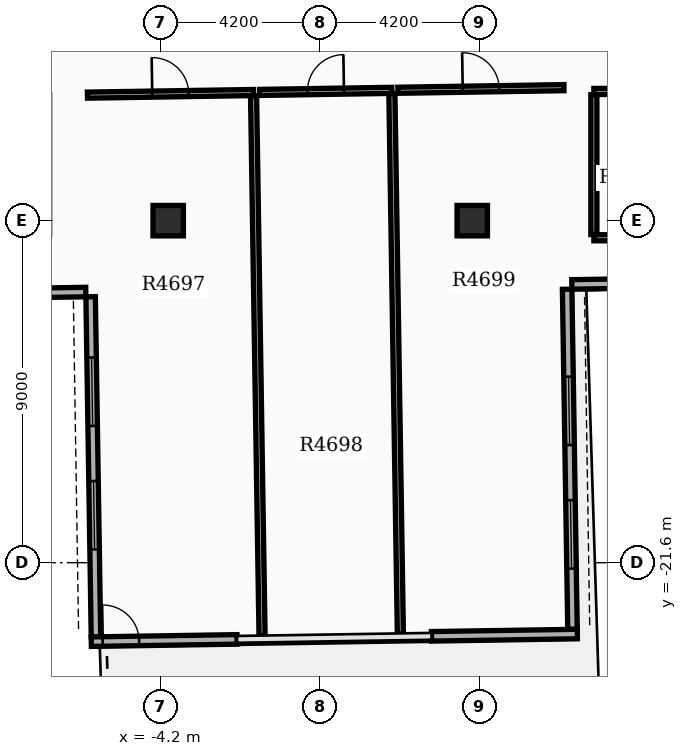
"""IFC4 building model, lengths in metres.
Left out: names, types, materials, properties, quantities, classifications, styles, units other than length and angle.
Written with IfcOpenShell. Run it as: python <this file> out.ifc"""

import sys

from ifc_helpers import new_model, si_unit, direction, frame, frame_2d, origin, origin_2d, place, context, subcontext, project, spatial, rectangle, extrude, element, fill, save


model = new_model("IFC4")
c1 = context("Model", 3, precision=1e-05, world=origin(), true_north=direction((0.0, 1.0)))
c2 = subcontext(c1, "Body", "Model", "MODEL_VIEW")
j1 = project(units=[si_unit("LENGTHUNIT", "METRE"), si_unit("PLANEANGLEUNIT", "RADIAN")], contexts=[c1])
p1 = place(None, origin())
s1 = spatial("IfcSite", under=j1, at=p1, CompositionType="ELEMENT")
p2 = place(p1, origin())
s2 = spatial("IfcBuilding", under=s1, at=p2, CompositionType="ELEMENT")
p3 = place(p2, frame((0.0, 0.0, 303.9)))
s3 = spatial("IfcBuildingStorey", under=s2, at=p3, CompositionType="ELEMENT", Elevation=303.9)
for number, where, z_axis, x_axis in (
    (1, (-4.0, -12.6, 0.0), (0.0, 0.0, 1.0), (1.0, 0.0, 0.0)),
    (2, (4.0, -12.6, 0.0), (0.0, 0.0, 1.0), (1.0, 0.0, 0.0)),
):
    element("IfcColumn", number, at=place(p3, frame(where, z_axis=z_axis, x_axis=x_axis)), inside=s3, PredefinedType="COLUMN", context=c2, shape_type="SweptSolid", body=[
        extrude(rectangle(XDim=0.8, YDim=0.8, at=origin_2d()), origin(), (0.0, 0.0, 1.0), 4.5),
    ])
p4 = place(p3, frame((-6.042, -14.602, 0.0), z_axis=(0.0, 0.0, 1.0), x_axis=(0.015712579601, -0.999876549801, 0.0)))
e3 = element("IfcWall", 3, at=p4, inside=s3, PredefinedType="STANDARD", context=c2, shape_type="SweptSolid", body=[
    extrude(rectangle(XDim=8.95, YDim=0.25, at=frame_2d((4.475, 0.0))), origin(), (0.0, 0.0, 1.0), 3.73),
])
p5 = place(p4, frame((1.6, 0.0, 0.8)))
e4 = element("IfcOpeningElement", 4, at=p5, cuts=e3, PredefinedType="OPENING", context=c2, shape_type="SweptSolid", body=[
    extrude(rectangle(XDim=1.8, YDim=1.8, at=frame_2d((0.9, 0.9))), frame((0.0, 0.135, 0.0), z_axis=(0.0, -1.0, 0.0), x_axis=(1.0, 0.0, 0.0)), (0.0, 0.0, 1.0), 0.27),
])
p6 = place(p4, frame((4.85, 0.0, 0.8)))
e5 = element("IfcOpeningElement", 5, at=p6, cuts=e3, PredefinedType="OPENING", context=c2, shape_type="SweptSolid", body=[
    extrude(rectangle(XDim=1.8, YDim=1.8, at=frame_2d((0.9, 0.9))), frame((0.0, 0.135, 0.0), z_axis=(0.0, -1.0, 0.0), x_axis=(1.0, 0.0, 0.0)), (0.0, 0.0, 1.0), 0.27),
])
p7 = place(p3, frame((6.638, -23.354, 0.0), z_axis=(0.0, 0.0, 1.0), x_axis=(-0.015712579601, 0.999876549801, 0.0)))
e6 = element("IfcWall", 6, at=p7, inside=s3, PredefinedType="STANDARD", context=c2, shape_type="SweptSolid", body=[
    extrude(rectangle(XDim=8.95, YDim=0.25, at=frame_2d((4.475, 0.0))), origin(), (0.0, 0.0, 1.0), 3.73),
])
p8 = place(p7, frame((1.6, 0.0, 0.8)))
e7 = element("IfcOpeningElement", 7, at=p8, cuts=e6, PredefinedType="OPENING", context=c2, shape_type="SweptSolid", body=[
    extrude(rectangle(XDim=1.8, YDim=1.8, at=frame_2d((0.9, 0.9))), frame((0.0, 0.135, 0.0), z_axis=(0.0, -1.0, 0.0), x_axis=(1.0, 0.0, 0.0)), (0.0, 0.0, 1.0), 0.27),
])
p9 = place(p7, frame((4.85, 0.0, 0.8)))
e8 = element("IfcOpeningElement", 8, at=p9, cuts=e6, PredefinedType="OPENING", context=c2, shape_type="SweptSolid", body=[
    extrude(rectangle(XDim=1.8, YDim=1.8, at=frame_2d((0.9, 0.9))), frame((0.0, 0.135, 0.0), z_axis=(0.0, -1.0, 0.0), x_axis=(1.0, 0.0, 0.0)), (0.0, 0.0, 1.0), 0.27),
])
p10 = place(p3, frame((-6.024, -23.677, 0.0), z_axis=(0.0, 0.0, 1.0), x_axis=(0.999876487775, 0.015716526186, 0.0)))
e9 = element("IfcWall", 9, at=p10, inside=s3, PredefinedType="STANDARD", context=c2, shape_type="SweptSolid", body=[
    extrude(rectangle(XDim=3.837, YDim=0.25, at=frame_2d((1.918, 0.0))), origin(), (0.0, 0.0, 1.0), 3.73),
])
p11 = place(p10, frame((0.3, 0.0, 0.0)))
e10 = element("IfcOpeningElement", 10, at=p11, cuts=e9, PredefinedType="OPENING", context=c2, shape_type="SweptSolid", body=[
    extrude(rectangle(XDim=0.96, YDim=2.1, at=frame_2d((0.48, 1.05))), frame((0.0, 0.135, 0.0), z_axis=(0.0, -1.0, 0.0), x_axis=(1.0, 0.0, 0.0)), (0.0, 0.0, 1.0), 0.27),
])
p12 = place(p3, frame((2.928, -23.537, 0.0), z_axis=(0.0, 0.0, 1.0), x_axis=(0.99987650349, 0.015715526335, 0.0)))
e11 = element("IfcWall", 11, at=p12, inside=s3, PredefinedType="STANDARD", context=c2, shape_type="SweptSolid", body=[
    extrude(rectangle(XDim=3.837, YDim=0.25, at=frame_2d((1.918, 0.0))), origin(), (0.0, 0.0, 1.0), 3.73),
])
p13 = place(p3, frame((-12.528, -14.579, 0.0), z_axis=(0.0, 0.0, 1.0), x_axis=(0.999876749821, 0.015699846079, 0.0)))
e12 = element("IfcWall", 12, at=p13, inside=s3, PredefinedType="STANDARD", context=c2, shape_type="SweptSolid", body=[
    extrude(rectangle(XDim=6.36, YDim=0.25, at=frame_2d((3.18, 0.0))), origin(), (0.0, 0.0, 1.0), 3.73),
])
p14 = place(p3, frame((12.979, -14.178, 0.0), z_axis=(0.0, 0.0, 1.0), x_axis=(-0.999876740359, -0.015700448681, 0.0)))
e13 = element("IfcWall", 13, at=p14, inside=s3, PredefinedType="STANDARD", context=c2, shape_type="SweptSolid", body=[
    extrude(rectangle(XDim=6.36, YDim=0.25, at=frame_2d((3.18, 0.0))), origin(), (0.0, 0.0, 1.0), 3.73),
])
p15 = place(p3, frame((-6.125, -9.297, 0.0), z_axis=(0.0, 0.0, 1.0), x_axis=(0.999876762784, 0.015699020525, 0.0)))
e14 = element("IfcWall", 14, at=p15, inside=s3, PredefinedType="PARTITIONING", context=c2, shape_type="SweptSolid", body=[
    extrude(rectangle(XDim=4.37, YDim=0.16, at=frame_2d((2.185, 0.0))), origin(), (0.0, 0.0, 1.0), 3.72),
])
p16 = place(p15, frame((1.705, 0.0, 0.0)))
e15 = element("IfcOpeningElement", 15, at=p16, cuts=e14, PredefinedType="OPENING", context=c2, shape_type="SweptSolid", body=[
    extrude(rectangle(XDim=0.96, YDim=2.15, at=frame_2d((0.48, 1.075))), frame((0.0, 0.09, 0.0), z_axis=(0.0, -1.0, 0.0), x_axis=(1.0, 0.0, 0.0)), (0.0, 0.0, 1.0), 0.18),
])
p17 = place(p3, frame((-1.531, -23.522, 0.0), z_axis=(0.0, 0.0, 1.0), x_axis=(-0.015703340364, 0.999876694949, 0.0)))
e16 = element("IfcWall", 16, at=p17, inside=s3, PredefinedType="PARTITIONING", context=c2, shape_type="SweptSolid", body=[
    extrude(rectangle(XDim=14.21, YDim=0.16, at=frame_2d((7.105, 0.0))), origin(), (0.0, 0.0, 1.0), 3.72),
])
p18 = place(p3, frame((-1.595, -9.226, 0.0), z_axis=(0.0, 0.0, 1.0), x_axis=(0.999875404533, 0.015785290908, 0.0)))
e17 = element("IfcWall", 17, at=p18, inside=s3, PredefinedType="PARTITIONING", context=c2, shape_type="SweptSolid", body=[
    extrude(rectangle(XDim=3.48, YDim=0.16, at=frame_2d((1.74, 0.0))), origin(), (0.0, 0.0, 1.0), 3.72),
])
p19 = place(p18, frame((1.26, 0.0, 0.0)))
e18 = element("IfcOpeningElement", 18, at=p19, cuts=e17, PredefinedType="OPENING", context=c2, shape_type="SweptSolid", body=[
    extrude(rectangle(XDim=0.96, YDim=2.15, at=frame_2d((0.48, 1.075))), frame((0.0, 0.09, 0.0), z_axis=(0.0, -1.0, 0.0), x_axis=(1.0, 0.0, 0.0)), (0.0, 0.0, 1.0), 0.18),
])
p20 = place(p3, frame((2.109, -23.465, 0.0), z_axis=(0.0, 0.0, 1.0), x_axis=(-0.015720517018, 0.999876425037, 0.0)))
e19 = element("IfcWall", 19, at=p20, inside=s3, PredefinedType="PARTITIONING", context=c2, shape_type="SweptSolid", body=[
    extrude(rectangle(XDim=14.21, YDim=0.16, at=frame_2d((7.105, 0.0))), origin(), (0.0, 0.0, 1.0), 3.72),
])
p21 = place(p3, frame((2.044, -9.169, 0.0), z_axis=(0.0, 0.0, 1.0), x_axis=(0.999876776552, 0.015698143603, 0.0)))
e20 = element("IfcWall", 20, at=p21, inside=s3, PredefinedType="PARTITIONING", context=c2, shape_type="SweptSolid", body=[
    extrude(rectangle(XDim=4.37, YDim=0.16, at=frame_2d((2.185, 0.0))), origin(), (0.0, 0.0, 1.0), 3.72),
])
p22 = place(p21, frame((1.705, 0.0, 0.0)))
e21 = element("IfcOpeningElement", 21, at=p22, cuts=e20, PredefinedType="OPENING", context=c2, shape_type="SweptSolid", body=[
    extrude(rectangle(XDim=0.96, YDim=2.15, at=frame_2d((0.48, 1.075))), frame((0.0, 0.09, 0.0), z_axis=(0.0, -1.0, 0.0), x_axis=(1.0, 0.0, 0.0)), (0.0, 0.0, 1.0), 0.18),
])
p23 = place(p3, frame((7.2, -13.05, 0.0), z_axis=(0.0, 0.0, 1.0), x_axis=(1.0, 0.0, 0.0)))
e22 = element("IfcWall", 22, at=p23, inside=s3, PredefinedType="PARTITIONING", context=c2, shape_type="SweptSolid", body=[
    extrude(rectangle(XDim=1.95, YDim=0.16, at=frame_2d((0.975, 0.0))), origin(), (0.0, 0.0, 1.0), 3.72),
])
p24 = place(p3, frame((7.2, -9.2, 0.0), z_axis=(0.0, 0.0, 1.0), x_axis=(1.0, 0.0, 0.0)))
e23 = element("IfcWall", 23, at=p24, inside=s3, PredefinedType="PARTITIONING", context=c2, shape_type="SweptSolid", body=[
    extrude(rectangle(XDim=1.95, YDim=0.16, at=frame_2d((0.975, 0.0))), origin(), (0.0, 0.0, 1.0), 3.72),
])
p25 = place(p24, frame((0.495, 0.0, 0.0)))
e24 = element("IfcOpeningElement", 24, at=p25, cuts=e23, PredefinedType="OPENING", context=c2, shape_type="SweptSolid", body=[
    extrude(rectangle(XDim=0.96, YDim=2.15, at=frame_2d((0.48, 1.075))), frame((0.0, 0.09, 0.0), z_axis=(0.0, -1.0, 0.0), x_axis=(1.0, 0.0, 0.0)), (0.0, 0.0, 1.0), 0.18),
])
p26 = place(p3, frame((7.2, -12.965, 0.0), z_axis=(0.0, 0.0, 1.0), x_axis=(0.0, 1.0, 0.0)))
e25 = element("IfcWall", 25, at=p26, inside=s3, PredefinedType="PARTITIONING", context=c2, shape_type="SweptSolid", body=[
    extrude(rectangle(XDim=3.68, YDim=0.16, at=frame_2d((1.84, 0.0))), origin(), (0.0, 0.0, 1.0), 3.72),
])
p27 = place(p5, origin())
e26 = element("IfcWindow", 26, at=p27, inside=s3, PartitioningType="SINGLE_PANEL", PredefinedType="WINDOW", context=c2, shape_type="SweptSolid", body=[
    extrude(rectangle(XDim=1.8, YDim=1.8, at=frame_2d((0.9, 0.9))), frame((0.0, 0.03, 0.0), z_axis=(0.0, -1.0, 0.0), x_axis=(1.0, 0.0, 0.0)), (0.0, 0.0, 1.0), 0.06),
])
fill(e4, e26)
p28 = place(p6, origin())
e27 = element("IfcWindow", 27, at=p28, inside=s3, PartitioningType="SINGLE_PANEL", PredefinedType="WINDOW", context=c2, shape_type="SweptSolid", body=[
    extrude(rectangle(XDim=1.8, YDim=1.8, at=frame_2d((0.9, 0.9))), frame((0.0, 0.03, 0.0), z_axis=(0.0, -1.0, 0.0), x_axis=(1.0, 0.0, 0.0)), (0.0, 0.0, 1.0), 0.06),
])
fill(e5, e27)
p29 = place(p8, origin())
e28 = element("IfcWindow", 28, at=p29, inside=s3, PartitioningType="SINGLE_PANEL", PredefinedType="WINDOW", context=c2, shape_type="SweptSolid", body=[
    extrude(rectangle(XDim=1.8, YDim=1.8, at=frame_2d((0.9, 0.9))), frame((0.0, 0.03, 0.0), z_axis=(0.0, -1.0, 0.0), x_axis=(1.0, 0.0, 0.0)), (0.0, 0.0, 1.0), 0.06),
])
fill(e7, e28)
p30 = place(p9, origin())
e29 = element("IfcWindow", 29, at=p30, inside=s3, PartitioningType="SINGLE_PANEL", PredefinedType="WINDOW", context=c2, shape_type="SweptSolid", body=[
    extrude(rectangle(XDim=1.8, YDim=1.8, at=frame_2d((0.9, 0.9))), frame((0.0, 0.03, 0.0), z_axis=(0.0, -1.0, 0.0), x_axis=(1.0, 0.0, 0.0)), (0.0, 0.0, 1.0), 0.06),
])
fill(e8, e29)
p31 = place(p11, origin())
e30 = element("IfcDoor", 30, at=p31, inside=s3, OperationType="SINGLE_SWING_LEFT", PredefinedType="DOOR", context=c2, shape_type="SweptSolid", body=[
    extrude(rectangle(XDim=0.96, YDim=2.1, at=frame_2d((0.48, 1.05))), frame((0.0, 0.025, 0.0), z_axis=(0.0, -1.0, 0.0), x_axis=(1.0, 0.0, 0.0)), (0.0, 0.0, 1.0), 0.05),
])
fill(e10, e30)
p32 = place(p16, origin())
e31 = element("IfcDoor", 31, at=p32, inside=s3, OperationType="SINGLE_SWING_LEFT", PredefinedType="DOOR", context=c2, shape_type="SweptSolid", body=[
    extrude(rectangle(XDim=0.96, YDim=2.15, at=frame_2d((0.48, 1.075))), frame((0.0, 0.025, 0.0), z_axis=(0.0, -1.0, 0.0), x_axis=(1.0, 0.0, 0.0)), (0.0, 0.0, 1.0), 0.05),
])
fill(e15, e31)
p33 = place(p19, origin())
e32 = element("IfcDoor", 32, at=p33, inside=s3, OperationType="SINGLE_SWING_RIGHT", PredefinedType="DOOR", context=c2, shape_type="SweptSolid", body=[
    extrude(rectangle(XDim=0.96, YDim=2.15, at=frame_2d((0.48, 1.075))), frame((0.0, 0.025, 0.0), z_axis=(0.0, -1.0, 0.0), x_axis=(1.0, 0.0, 0.0)), (0.0, 0.0, 1.0), 0.05),
])
fill(e18, e32)
p34 = place(p22, origin())
e33 = element("IfcDoor", 33, at=p34, inside=s3, OperationType="SINGLE_SWING_LEFT", PredefinedType="DOOR", context=c2, shape_type="SweptSolid", body=[
    extrude(rectangle(XDim=0.96, YDim=2.15, at=frame_2d((0.48, 1.075))), frame((0.0, 0.025, 0.0), z_axis=(0.0, -1.0, 0.0), x_axis=(1.0, 0.0, 0.0)), (0.0, 0.0, 1.0), 0.05),
])
fill(e21, e33)
save(model, sys.argv[1])
